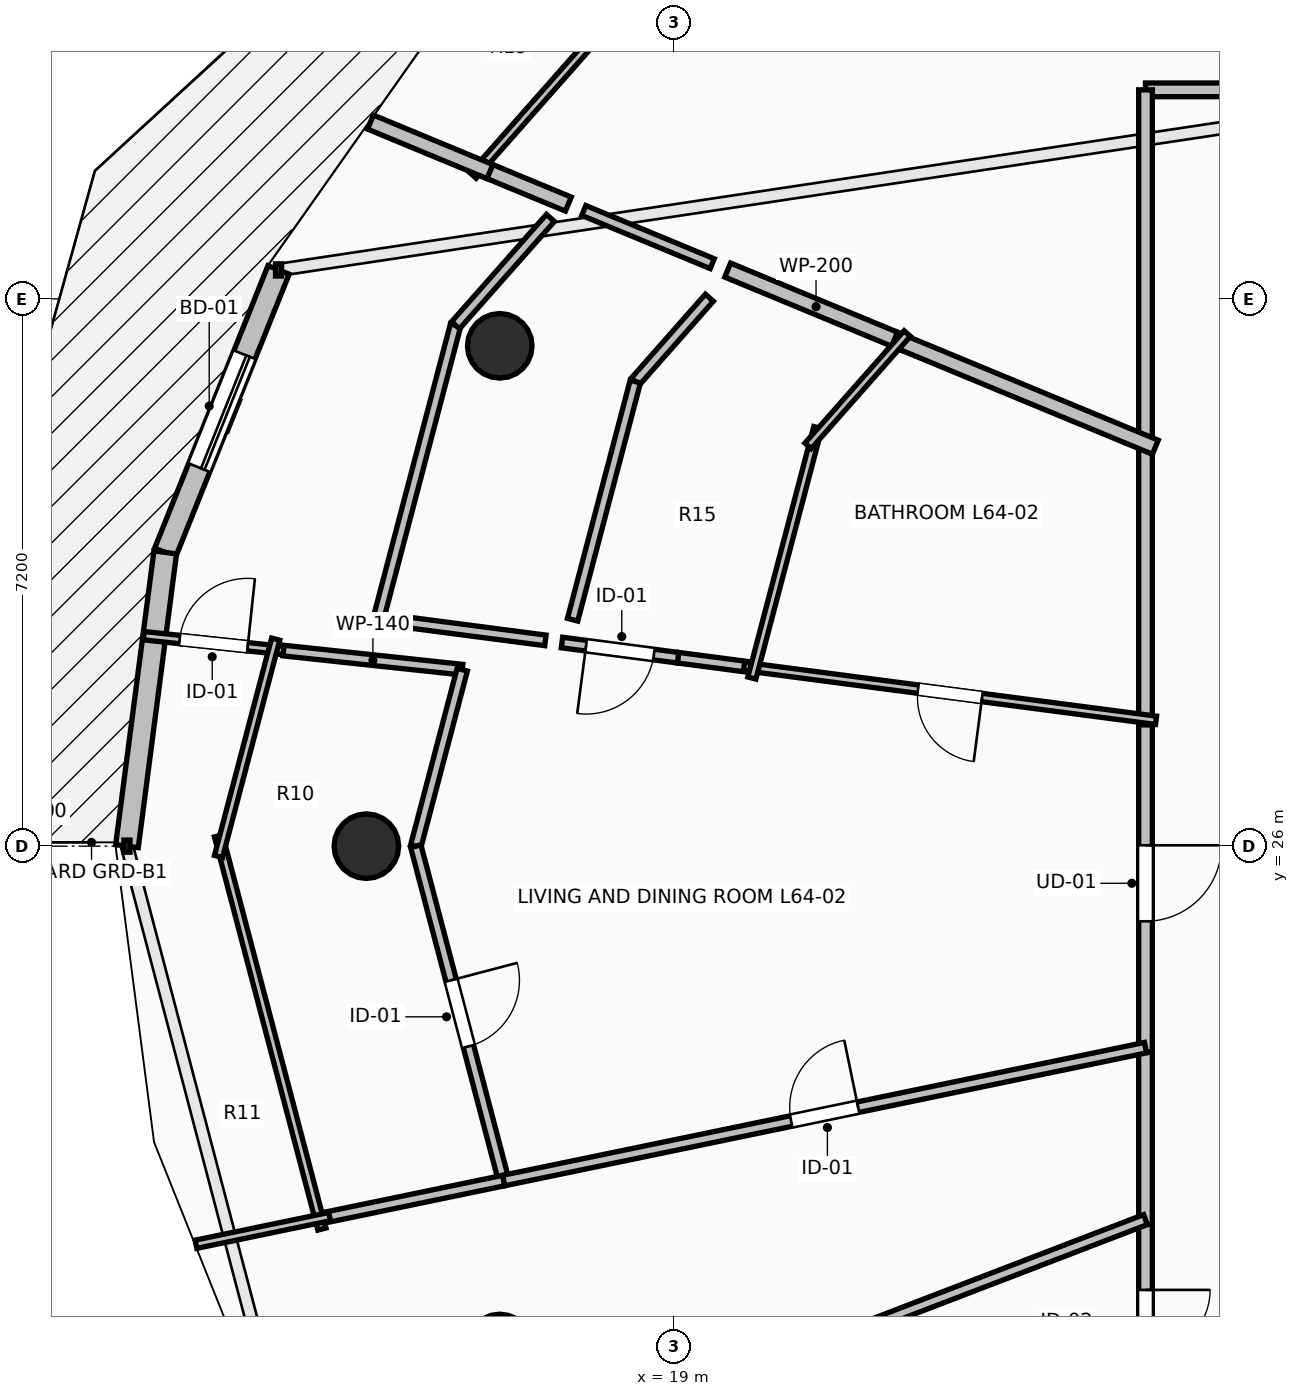
"""IFC4 building model, lengths in metres.
Left out: names, types, materials, properties, quantities, classifications, styles, units other than length and angle.
Written with IfcOpenShell. Run it as: python <this file> out.ifc"""

import sys

from ifc_helpers import new_model, si_unit, direction, frame, frame_2d, origin, origin_2d, place, context, subcontext, project, spatial, rectangle, circle, extrude, element, fill, save


model = new_model("IFC4")
c1 = context("Model", 3, precision=1e-05, world=origin(), true_north=direction((0.0, 1.0)))
c2 = subcontext(c1, "Body", "Model", "MODEL_VIEW")
j1 = project(units=[si_unit("LENGTHUNIT", "METRE"), si_unit("PLANEANGLEUNIT", "RADIAN")], contexts=[c1])
p1 = place(None, origin())
s1 = spatial("IfcSite", under=j1, at=p1, CompositionType="ELEMENT")
p2 = place(p1, origin())
s2 = spatial("IfcBuilding", under=s1, at=p2, CompositionType="ELEMENT")
p3 = place(p2, frame((0.0, 0.0, 237.8)))
s3 = spatial("IfcBuildingStorey", under=s2, at=p3, CompositionType="ELEMENT", Elevation=237.8)
for number, where, z_axis, x_axis in (
    (1, (16.705, 32.582, 0.0), (0.0, 0.0, 1.0), (-0.924, 0.383, 0.0)),
    (2, (14.95, 26.0, 0.0), (0.0, 0.0, 1.0), (-1.0, 0.0, 0.0)),
    (3, (16.705, 19.418, 0.0), (0.0, 0.0, 1.0), (-0.924, -0.383, 0.0)),
):
    element("IfcColumn", number, at=place(p3, frame(where, z_axis=z_axis, x_axis=x_axis)), inside=s3, PredefinedType="COLUMN", context=c2, shape_type="SweptSolid", body=[
        extrude(circle(Radius=0.425, at=origin_2d()), origin(), (0.0, 0.0, 1.0), 3.55),
    ])
p4 = place(p3, frame((13.794, 33.581, 0.0), z_axis=(0.0, 0.0, 1.0), x_axis=(-0.37234708598, -0.928093555393, 0.0)))
e4 = element("IfcWall", 4, at=p4, inside=s3, PredefinedType="STANDARD", context=c2, shape_type="SweptSolid", body=[
    extrude(rectangle(XDim=4.004, YDim=0.3, at=frame_2d((2.002, 0.0))), origin(), (0.0, 0.0, 1.0), 3.29),
])
p5 = place(p4, frame((1.202, 0.0, 0.0)))
e5 = element("IfcOpeningElement", 5, at=p5, cuts=e4, PredefinedType="OPENING", context=c2, shape_type="SweptSolid", body=[
    extrude(rectangle(XDim=1.6, YDim=2.3, at=frame_2d((0.8, 1.15))), frame((0.0, 0.165, 0.0), z_axis=(0.0, -1.0, 0.0), x_axis=(1.0, 0.0, 0.0)), (0.0, 0.0, 1.0), 0.33),
])
p6 = place(p3, frame((12.303, 29.865, 0.0), z_axis=(0.0, 0.0, 1.0), x_axis=(-0.129167789917, -0.991622751881, 0.0)))
e6 = element("IfcWall", 6, at=p6, inside=s3, PredefinedType="STANDARD", context=c2, shape_type="SweptSolid", body=[
    extrude(rectangle(XDim=3.897, YDim=0.3, at=frame_2d((1.949, 0.0))), origin(), (0.0, 0.0, 1.0), 3.29),
])
p7 = place(p3, frame((34.999, 35.95, 0.0), z_axis=(0.0, 0.0, 1.0), x_axis=(-1.0, 0.0, 0.0)))
e7 = element("IfcWall", 7, at=p7, inside=s3, PredefinedType="PARTITIONING", context=c2, shape_type="SweptSolid", body=[
    extrude(rectangle(XDim=9.799, YDim=0.18, at=frame_2d((4.899, 0.0))), origin(), (0.0, 0.0, 1.0), 2.482),
])
p8 = place(p7, frame((4.399, 0.0, 0.0)))
e8 = element("IfcOpeningElement", 8, at=p8, cuts=e7, PredefinedType="OPENING", context=c2, shape_type="SweptSolid", body=[
    extrude(rectangle(XDim=1.0, YDim=2.15, at=frame_2d((0.5, 1.075))), frame((0.0, 0.105, 0.0), z_axis=(0.0, -1.0, 0.0), x_axis=(1.0, 0.0, 0.0)), (0.0, 0.0, 1.0), 0.21),
])
p9 = place(p3, frame((25.2, 35.95, 0.0), z_axis=(0.0, 0.0, 1.0), x_axis=(0.0, -1.0, 0.0)))
e9 = element("IfcWall", 9, at=p9, inside=s3, PredefinedType="PARTITIONING", context=c2, shape_type="SweptSolid", body=[
    extrude(rectangle(XDim=4.708, YDim=0.18, at=frame_2d((2.354, 0.0))), origin(), (0.0, 0.0, 1.0), 2.482),
])
p10 = place(p3, frame((25.2, 27.735, 0.0), z_axis=(0.0, 0.0, 1.0), x_axis=(0.0, -1.0, 0.0)))
e10 = element("IfcWall", 10, at=p10, inside=s3, PredefinedType="PARTITIONING", context=c2, shape_type="SweptSolid", body=[
    extrude(rectangle(XDim=4.447, YDim=0.18, at=frame_2d((2.224, 0.0))), origin(), (0.0, 0.0, 1.0), 2.482),
])
p11 = place(p10, frame((1.723, 0.0, 0.0)))
e11 = element("IfcOpeningElement", 11, at=p11, cuts=e10, PredefinedType="OPENING", context=c2, shape_type="SweptSolid", body=[
    extrude(rectangle(XDim=1.0, YDim=2.15, at=frame_2d((0.5, 1.075))), frame((0.0, 0.105, 0.0), z_axis=(0.0, -1.0, 0.0), x_axis=(1.0, 0.0, 0.0)), (0.0, 0.0, 1.0), 0.21),
])
p12 = place(p3, frame((25.2, 31.382, 0.0), z_axis=(0.0, 0.0, 1.0), x_axis=(0.0, -1.0, 0.0)))
e12 = element("IfcWall", 12, at=p12, inside=s3, PredefinedType="PARTITIONING", context=c2, shape_type="SweptSolid", body=[
    extrude(rectangle(XDim=3.787, YDim=0.18, at=frame_2d((1.894, 0.0))), origin(), (0.0, 0.0, 1.0), 2.482),
])
p13 = place(p3, frame((25.2, 23.288, 0.0), z_axis=(0.0, 0.0, 1.0), x_axis=(0.0, -1.0, 0.0)))
e13 = element("IfcWall", 13, at=p13, inside=s3, PredefinedType="PARTITIONING", context=c2, shape_type="SweptSolid", body=[
    extrude(rectangle(XDim=2.265, YDim=0.18, at=frame_2d((1.133, 0.0))), origin(), (0.0, 0.0, 1.0), 3.29),
])
p14 = place(p3, frame((25.2, 21.023, 0.0), z_axis=(0.0, 0.0, 1.0), x_axis=(0.0, -1.0, 0.0)))
e14 = element("IfcWall", 14, at=p14, inside=s3, PredefinedType="PARTITIONING", context=c2, shape_type="SweptSolid", body=[
    extrude(rectangle(XDim=2.572, YDim=0.18, at=frame_2d((1.286, 0.0))), origin(), (0.0, 0.0, 1.0), 3.29),
])
p15 = place(p14, frame((0.861, 0.0, 0.0)))
e15 = element("IfcOpeningElement", 15, at=p15, cuts=e14, PredefinedType="OPENING", context=c2, shape_type="SweptSolid", body=[
    extrude(rectangle(XDim=0.85, YDim=2.1, at=frame_2d((0.425, 1.05))), frame((0.0, 0.105, 0.0), z_axis=(0.0, -1.0, 0.0), x_axis=(1.0, 0.0, 0.0)), (0.0, 0.0, 1.0), 0.21),
])
p16 = place(p3, frame((20.444, 39.452, 0.0), z_axis=(0.0, 0.0, 1.0), x_axis=(-0.662167862663, -0.749355537549, 0.0)))
e16 = element("IfcWall", 16, at=p16, inside=s3, PredefinedType="PARTITIONING", context=c2, shape_type="SweptSolid", body=[
    extrude(rectangle(XDim=6.177, YDim=0.11, at=frame_2d((3.089, 0.0))), origin(), (0.0, 0.0, 1.0), 3.29),
])
p17 = place(p3, frame((16.446, 34.928, 0.0), z_axis=(0.0, 0.0, 1.0), x_axis=(0.923851056351, -0.382752172663, 0.0)))
e17 = element("IfcWall", 17, at=p17, inside=s3, PredefinedType="PARTITIONING", context=c2, shape_type="SweptSolid", body=[
    extrude(rectangle(XDim=1.257, YDim=0.2, at=frame_2d((0.628, 0.0))), origin(), (0.0, 0.0, 1.0), 3.29),
])
p18 = place(p3, frame((19.703, 33.579, 0.0), z_axis=(0.0, 0.0, 1.0), x_axis=(0.923878502515, -0.382685918986, 0.0)))
e18 = element("IfcWall", 18, at=p18, inside=s3, PredefinedType="PARTITIONING", context=c2, shape_type="SweptSolid", body=[
    extrude(rectangle(XDim=2.517, YDim=0.2, at=frame_2d((1.258, 0.0))), origin(), (0.0, 0.0, 1.0), 2.924),
])
p19 = place(p3, frame((21.899, 32.669, 0.0), z_axis=(0.0, 0.0, 1.0), x_axis=(0.9238685833, -0.382709865029, 0.0)))
e19 = element("IfcWall", 19, at=p19, inside=s3, PredefinedType="PARTITIONING", context=c2, shape_type="SweptSolid", body=[
    extrude(rectangle(XDim=3.713, YDim=0.2, at=frame_2d((1.857, 0.0))), origin(), (0.0, 0.0, 1.0), 2.972),
])
p20 = place(p3, frame((15.004, 35.526, 0.0), z_axis=(0.0, 0.0, 1.0), x_axis=(0.923843638485, -0.382770076719, 0.0)))
e20 = element("IfcWall", 20, at=p20, inside=s3, PredefinedType="PARTITIONING", context=c2, shape_type="SweptSolid", body=[
    extrude(rectangle(XDim=1.701, YDim=0.2, at=frame_2d((0.851, 0.0))), origin(), (0.0, 0.0, 1.0), 3.29),
])
p21 = place(p3, frame((20.057, 28.347, 0.0), z_axis=(0.0, 0.0, 1.0), x_axis=(-0.99150495655, 0.130068909188, 0.0)))
e21 = element("IfcWall", 21, at=p21, inside=s3, PredefinedType="PARTITIONING", context=c2, shape_type="SweptSolid", body=[
    extrude(rectangle(XDim=1.015, YDim=0.14, at=frame_2d((0.508, 0.0))), origin(), (0.0, 0.0, 1.0), 2.924),
])
p22 = place(p3, frame((19.05, 28.479, 0.0), z_axis=(0.0, 0.0, 1.0), x_axis=(-0.991536647804, 0.129827100648, 0.0)))
e22 = element("IfcWall", 22, at=p22, inside=s3, PredefinedType="PARTITIONING", context=c2, shape_type="SweptSolid", body=[
    extrude(rectangle(XDim=1.54, YDim=0.14, at=frame_2d((0.77, 0.0))), origin(), (0.0, 0.0, 1.0), 3.29),
])
p23 = place(p22, frame((0.32, 0.0, 0.0)))
e23 = element("IfcOpeningElement", 23, at=p23, cuts=e22, PredefinedType="OPENING", context=c2, shape_type="SweptSolid", body=[
    extrude(rectangle(XDim=0.9, YDim=2.1, at=frame_2d((0.45, 1.05))), frame((0.0, 0.085, 0.0), z_axis=(0.0, -1.0, 0.0), x_axis=(1.0, 0.0, 0.0)), (0.0, 0.0, 1.0), 0.17),
])
p24 = place(p3, frame((25.339, 27.656, 0.0), z_axis=(0.0, 0.0, 1.0), x_axis=(-0.991543288598, 0.129776372412, 0.0)))
e24 = element("IfcWall", 24, at=p24, inside=s3, PredefinedType="PARTITIONING", context=c2, shape_type="SweptSolid", body=[
    extrude(rectangle(XDim=5.467, YDim=0.11, at=frame_2d((2.733, 0.0))), origin(), (0.0, 0.0, 1.0), 2.482),
])
p25 = place(p24, frame((2.308, 0.0, 0.0)))
e25 = element("IfcOpeningElement", 25, at=p25, cuts=e24, PredefinedType="OPENING", context=c2, shape_type="SweptSolid", body=[
    extrude(rectangle(XDim=0.85, YDim=2.1, at=frame_2d((0.425, 1.05))), frame((0.0, 0.07, 0.0), z_axis=(0.0, -1.0, 0.0), x_axis=(1.0, 0.0, 0.0)), (0.0, 0.0, 1.0), 0.14),
])
p26 = place(p3, frame((12.021, 28.769, 0.0), z_axis=(0.0, 0.0, 1.0), x_axis=(0.994395705484, -0.105722187429, 0.0)))
e26 = element("IfcWall", 26, at=p26, inside=s3, PredefinedType="PARTITIONING", context=c2, shape_type="SweptSolid", body=[
    extrude(rectangle(XDim=1.85, YDim=0.11, at=frame_2d((0.925, 0.0))), origin(), (0.0, 0.0, 1.0), 3.29),
])
p27 = place(p26, frame((0.475, 0.0, 0.0)))
e27 = element("IfcOpeningElement", 27, at=p27, cuts=e26, PredefinedType="OPENING", context=c2, shape_type="SweptSolid", body=[
    extrude(rectangle(XDim=0.9, YDim=2.1, at=frame_2d((0.45, 1.05))), frame((0.0, 0.07, 0.0), z_axis=(0.0, -1.0, 0.0), x_axis=(1.0, 0.0, 0.0)), (0.0, 0.0, 1.0), 0.14),
])
p28 = place(p3, frame((13.86, 28.573, 0.0), z_axis=(0.0, 0.0, 1.0), x_axis=(0.994349321614, -0.106157555574, 0.0)))
e28 = element("IfcWall", 28, at=p28, inside=s3, PredefinedType="PARTITIONING", context=c2, shape_type="SweptSolid", body=[
    extrude(rectangle(XDim=2.364, YDim=0.14, at=frame_2d((1.182, 0.0))), origin(), (0.0, 0.0, 1.0), 2.874),
])
p29 = place(p3, frame((16.211, 28.322, 0.0), z_axis=(0.0, 0.0, 1.0), x_axis=(-0.254408212112, -0.96709692462, 0.0)))
e29 = element("IfcWall", 29, at=p29, inside=s3, PredefinedType="PARTITIONING", context=c2, shape_type="SweptSolid", body=[
    extrude(rectangle(XDim=2.401, YDim=0.14, at=frame_2d((1.201, 0.0))), origin(), (0.0, 0.0, 1.0), 2.482),
])
p30 = place(p3, frame((15.6, 26.0, 0.0), z_axis=(0.0, 0.0, 1.0), x_axis=(0.25436383836, -0.967108596661, 0.0)))
e30 = element("IfcWall", 30, at=p30, inside=s3, PredefinedType="PARTITIONING", context=c2, shape_type="SweptSolid", body=[
    extrude(rectangle(XDim=4.549, YDim=0.14, at=frame_2d((2.274, 0.0))), origin(), (0.0, 0.0, 1.0), 2.482),
])
p31 = place(p30, frame((1.824, 0.0, 0.0)))
e31 = element("IfcOpeningElement", 31, at=p31, cuts=e30, PredefinedType="OPENING", context=c2, shape_type="SweptSolid", body=[
    extrude(rectangle(XDim=0.9, YDim=2.1, at=frame_2d((0.45, 1.05))), frame((0.0, 0.085, 0.0), z_axis=(0.0, -1.0, 0.0), x_axis=(1.0, 0.0, 0.0)), (0.0, 0.0, 1.0), 0.17),
])
p32 = place(p3, frame((16.757, 21.601, 0.0), z_axis=(0.0, 0.0, 1.0), x_axis=(-0.979193678003, -0.2029279206, 0.0)))
e32 = element("IfcWall", 32, at=p32, inside=s3, PredefinedType="PARTITIONING", context=c2, shape_type="SweptSolid", body=[
    extrude(rectangle(XDim=2.479, YDim=0.14, at=frame_2d((1.24, 0.0))), origin(), (0.0, 0.0, 1.0), 2.874),
])
p33 = place(p3, frame((16.757, 21.601, 0.0), z_axis=(0.0, 0.0, 1.0), x_axis=(0.979226116247, 0.20277133244, 0.0)))
e33 = element("IfcWall", 33, at=p33, inside=s3, PredefinedType="PARTITIONING", context=c2, shape_type="SweptSolid", body=[
    extrude(rectangle(XDim=8.622, YDim=0.14, at=frame_2d((4.311, 0.0))), origin(), (0.0, 0.0, 1.0), 2.924),
])
p34 = place(p33, frame((3.861, 0.0, 0.0)))
e34 = element("IfcOpeningElement", 34, at=p34, cuts=e33, PredefinedType="OPENING", context=c2, shape_type="SweptSolid", body=[
    extrude(rectangle(XDim=0.9, YDim=2.1, at=frame_2d((0.45, 1.05))), frame((0.0, 0.085, 0.0), z_axis=(0.0, -1.0, 0.0), x_axis=(1.0, 0.0, 0.0)), (0.0, 0.0, 1.0), 0.17),
])
p35 = place(p3, frame((20.021, 28.212, 0.0), z_axis=(0.0, 0.0, 1.0), x_axis=(0.254539154478, 0.967062468943, 0.0)))
e35 = element("IfcWall", 35, at=p35, inside=s3, PredefinedType="PARTITIONING", context=c2, shape_type="SweptSolid", body=[
    extrude(rectangle(XDim=3.407, YDim=0.11, at=frame_2d((1.704, 0.0))), origin(), (0.0, 0.0, 1.0), 2.482),
])
p36 = place(p3, frame((20.76, 31.266, 0.0), z_axis=(0.0, 0.0, 1.0), x_axis=(0.662047420969, 0.749461948593, 0.0)))
e36 = element("IfcWall", 36, at=p36, inside=s3, PredefinedType="PARTITIONING", context=c2, shape_type="SweptSolid", body=[
    extrude(rectangle(XDim=1.972, YDim=0.11, at=frame_2d((0.986, 0.0))), origin(), (0.0, 0.0, 1.0), 3.29),
])
p37 = place(p3, frame((14.365, 20.963, 0.0), z_axis=(0.0, 0.0, 1.0), x_axis=(-0.254288836667, 0.967128320104, 0.0)))
e37 = element("IfcWall", 37, at=p37, inside=s3, PredefinedType="PARTITIONING", context=c2, shape_type="SweptSolid", body=[
    extrude(rectangle(XDim=5.349, YDim=0.11, at=frame_2d((2.674, 0.0))), origin(), (0.0, 0.0, 1.0), 3.29),
])
p38 = place(p3, frame((13.004, 25.865, 0.0), z_axis=(0.0, 0.0, 1.0), x_axis=(0.254448582557, 0.967086303716, 0.0)))
e38 = element("IfcWall", 38, at=p38, inside=s3, PredefinedType="PARTITIONING", context=c2, shape_type="SweptSolid", body=[
    extrude(rectangle(XDim=2.956, YDim=0.11, at=frame_2d((1.478, 0.0))), origin(), (0.0, 0.0, 1.0), 3.29),
])
p39 = place(p3, frame((12.708, 20.763, 0.0), z_axis=(0.0, 0.0, 1.0), x_axis=(0.979256697864, 0.202623591143, 0.0)))
e39 = element("IfcWall", 39, at=p39, inside=s3, PredefinedType="PARTITIONING", context=c2, shape_type="SweptSolid", body=[
    extrude(rectangle(XDim=1.795, YDim=0.11, at=frame_2d((0.898, 0.0))), origin(), (0.0, 0.0, 1.0), 3.29),
])
p40 = place(p3, frame((14.748, 17.074, 0.0), z_axis=(0.0, 0.0, 1.0), x_axis=(0.93355564233, 0.358432507836, 0.0)))
e40 = element("IfcWall", 40, at=p40, inside=s3, PredefinedType="PARTITIONING", context=c2, shape_type="SweptSolid", body=[
    extrude(rectangle(XDim=11.196, YDim=0.14, at=frame_2d((5.598, 0.0))), origin(), (0.0, 0.0, 1.0), 2.482),
])
p41 = place(p3, frame((17.81, 34.363, 0.0), z_axis=(0.0, 0.0, 1.0), x_axis=(0.923888322618, -0.382662210481, 0.0)))
e41 = element("IfcWall", 41, at=p41, inside=s3, PredefinedType="PARTITIONING", context=c2, shape_type="SweptSolid", body=[
    extrude(rectangle(XDim=1.829, YDim=0.14, at=frame_2d((0.915, 0.0))), origin(), (0.0, 0.0, 1.0), 2.874),
])
p42 = place(p3, frame((17.305, 28.707, 0.0), z_axis=(0.0, 0.0, 1.0), x_axis=(-0.991583198316, 0.129471081011, 0.0)))
e42 = element("IfcWall", 42, at=p42, inside=s3, PredefinedType="PARTITIONING", context=c2, shape_type="SweptSolid", body=[
    extrude(rectangle(XDim=2.216, YDim=0.14, at=frame_2d((1.108, 0.0))), origin(), (0.0, 0.0, 1.0), 2.874),
])
p43 = place(p3, frame((15.108, 28.994, 0.0), z_axis=(0.0, 0.0, 1.0), x_axis=(0.254393917139, 0.967100684997, 0.0)))
e43 = element("IfcWall", 43, at=p43, inside=s3, PredefinedType="PARTITIONING", context=c2, shape_type="SweptSolid", body=[
    extrude(rectangle(XDim=3.99, YDim=0.14, at=frame_2d((1.995, 0.0))), origin(), (0.0, 0.0, 1.0), 3.29),
])
p44 = place(p3, frame((16.123, 32.853, 0.0), z_axis=(0.0, 0.0, 1.0), x_axis=(0.662302679983, 0.749236384652, 0.0)))
e44 = element("IfcWall", 44, at=p44, inside=s3, PredefinedType="PARTITIONING", context=c2, shape_type="SweptSolid", body=[
    extrude(rectangle(XDim=1.885, YDim=0.14, at=frame_2d((0.942, 0.0))), origin(), (0.0, 0.0, 1.0), 3.29),
])
p45 = place(p3, frame((19.462, 33.215, 0.0), z_axis=(0.0, 0.0, 1.0), x_axis=(-0.661857573224, -0.749629610385, 0.0)))
e45 = element("IfcWall", 45, at=p45, inside=s3, PredefinedType="PARTITIONING", context=c2, shape_type="SweptSolid", body=[
    extrude(rectangle(XDim=1.471, YDim=0.14, at=frame_2d((0.736, 0.0))), origin(), (0.0, 0.0, 1.0), 2.482),
])
p46 = place(p3, frame((18.488, 32.112, 0.0), z_axis=(0.0, 0.0, 1.0), x_axis=(-0.254626828673, -0.967039388091, 0.0)))
e46 = element("IfcWall", 46, at=p46, inside=s3, PredefinedType="PARTITIONING", context=c2, shape_type="SweptSolid", body=[
    extrude(rectangle(XDim=3.24, YDim=0.14, at=frame_2d((1.62, 0.0))), origin(), (0.0, 0.0, 1.0), 2.482),
])
p47 = place(p5, origin())
e47 = element("IfcDoor", 47, at=p47, inside=s3, OperationType="SLIDING_TO_LEFT", PredefinedType="DOOR", context=c2, shape_type="SweptSolid", body=[
    extrude(rectangle(XDim=1.6, YDim=2.3, at=frame_2d((0.8, 1.15))), frame((0.0, 0.025, 0.0), z_axis=(0.0, -1.0, 0.0), x_axis=(1.0, 0.0, 0.0)), (0.0, 0.0, 1.0), 0.05),
])
fill(e5, e47)
p48 = place(p11, origin())
e48 = element("IfcDoor", 48, at=p48, inside=s3, OperationType="SINGLE_SWING_LEFT", PredefinedType="DOOR", context=c2, shape_type="SweptSolid", body=[
    extrude(rectangle(XDim=1.0, YDim=2.15, at=frame_2d((0.5, 1.075))), frame((0.0, 0.025, 0.0), z_axis=(0.0, -1.0, 0.0), x_axis=(1.0, 0.0, 0.0)), (0.0, 0.0, 1.0), 0.05),
])
fill(e11, e48)
p49 = place(p23, origin())
e49 = element("IfcDoor", 49, at=p49, inside=s3, OperationType="SINGLE_SWING_RIGHT", PredefinedType="DOOR", context=c2, shape_type="SweptSolid", body=[
    extrude(rectangle(XDim=0.9, YDim=2.1, at=frame_2d((0.45, 1.05))), frame((0.0, 0.025, 0.0), z_axis=(0.0, -1.0, 0.0), x_axis=(1.0, 0.0, 0.0)), (0.0, 0.0, 1.0), 0.05),
])
fill(e23, e49)
p50 = place(p25, origin())
e50 = element("IfcDoor", 50, at=p50, inside=s3, OperationType="SINGLE_SWING_LEFT", PredefinedType="DOOR", context=c2, shape_type="SweptSolid", body=[
    extrude(rectangle(XDim=0.85, YDim=2.1, at=frame_2d((0.425, 1.05))), frame((0.0, 0.025, 0.0), z_axis=(0.0, -1.0, 0.0), x_axis=(1.0, 0.0, 0.0)), (0.0, 0.0, 1.0), 0.05),
])
fill(e25, e50)
p51 = place(p27, origin())
e51 = element("IfcDoor", 51, at=p51, inside=s3, OperationType="SINGLE_SWING_RIGHT", PredefinedType="DOOR", context=c2, shape_type="SweptSolid", body=[
    extrude(rectangle(XDim=0.9, YDim=2.1, at=frame_2d((0.45, 1.05))), frame((0.0, 0.025, 0.0), z_axis=(0.0, -1.0, 0.0), x_axis=(1.0, 0.0, 0.0)), (0.0, 0.0, 1.0), 0.05),
])
fill(e27, e51)
p52 = place(p31, origin())
e52 = element("IfcDoor", 52, at=p52, inside=s3, OperationType="SINGLE_SWING_LEFT", PredefinedType="DOOR", context=c2, shape_type="SweptSolid", body=[
    extrude(rectangle(XDim=0.9, YDim=2.1, at=frame_2d((0.45, 1.05))), frame((0.0, 0.025, 0.0), z_axis=(0.0, -1.0, 0.0), x_axis=(1.0, 0.0, 0.0)), (0.0, 0.0, 1.0), 0.05),
])
fill(e31, e52)
p53 = place(p34, origin())
e53 = element("IfcDoor", 53, at=p53, inside=s3, OperationType="SINGLE_SWING_RIGHT", PredefinedType="DOOR", context=c2, shape_type="SweptSolid", body=[
    extrude(rectangle(XDim=0.9, YDim=2.1, at=frame_2d((0.45, 1.05))), frame((0.0, 0.025, 0.0), z_axis=(0.0, -1.0, 0.0), x_axis=(1.0, 0.0, 0.0)), (0.0, 0.0, 1.0), 0.05),
])
fill(e34, e53)
p54 = place(p15, origin())
e54 = element("IfcDoor", 54, at=p54, inside=s3, OperationType="SINGLE_SWING_LEFT", PredefinedType="DOOR", context=c2, shape_type="SweptSolid", body=[
    extrude(rectangle(XDim=0.85, YDim=2.1, at=frame_2d((0.425, 1.05))), frame((0.0, 0.025, 0.0), z_axis=(0.0, -1.0, 0.0), x_axis=(1.0, 0.0, 0.0)), (0.0, 0.0, 1.0), 0.05),
])
fill(e15, e54)
save(model, sys.argv[1])
